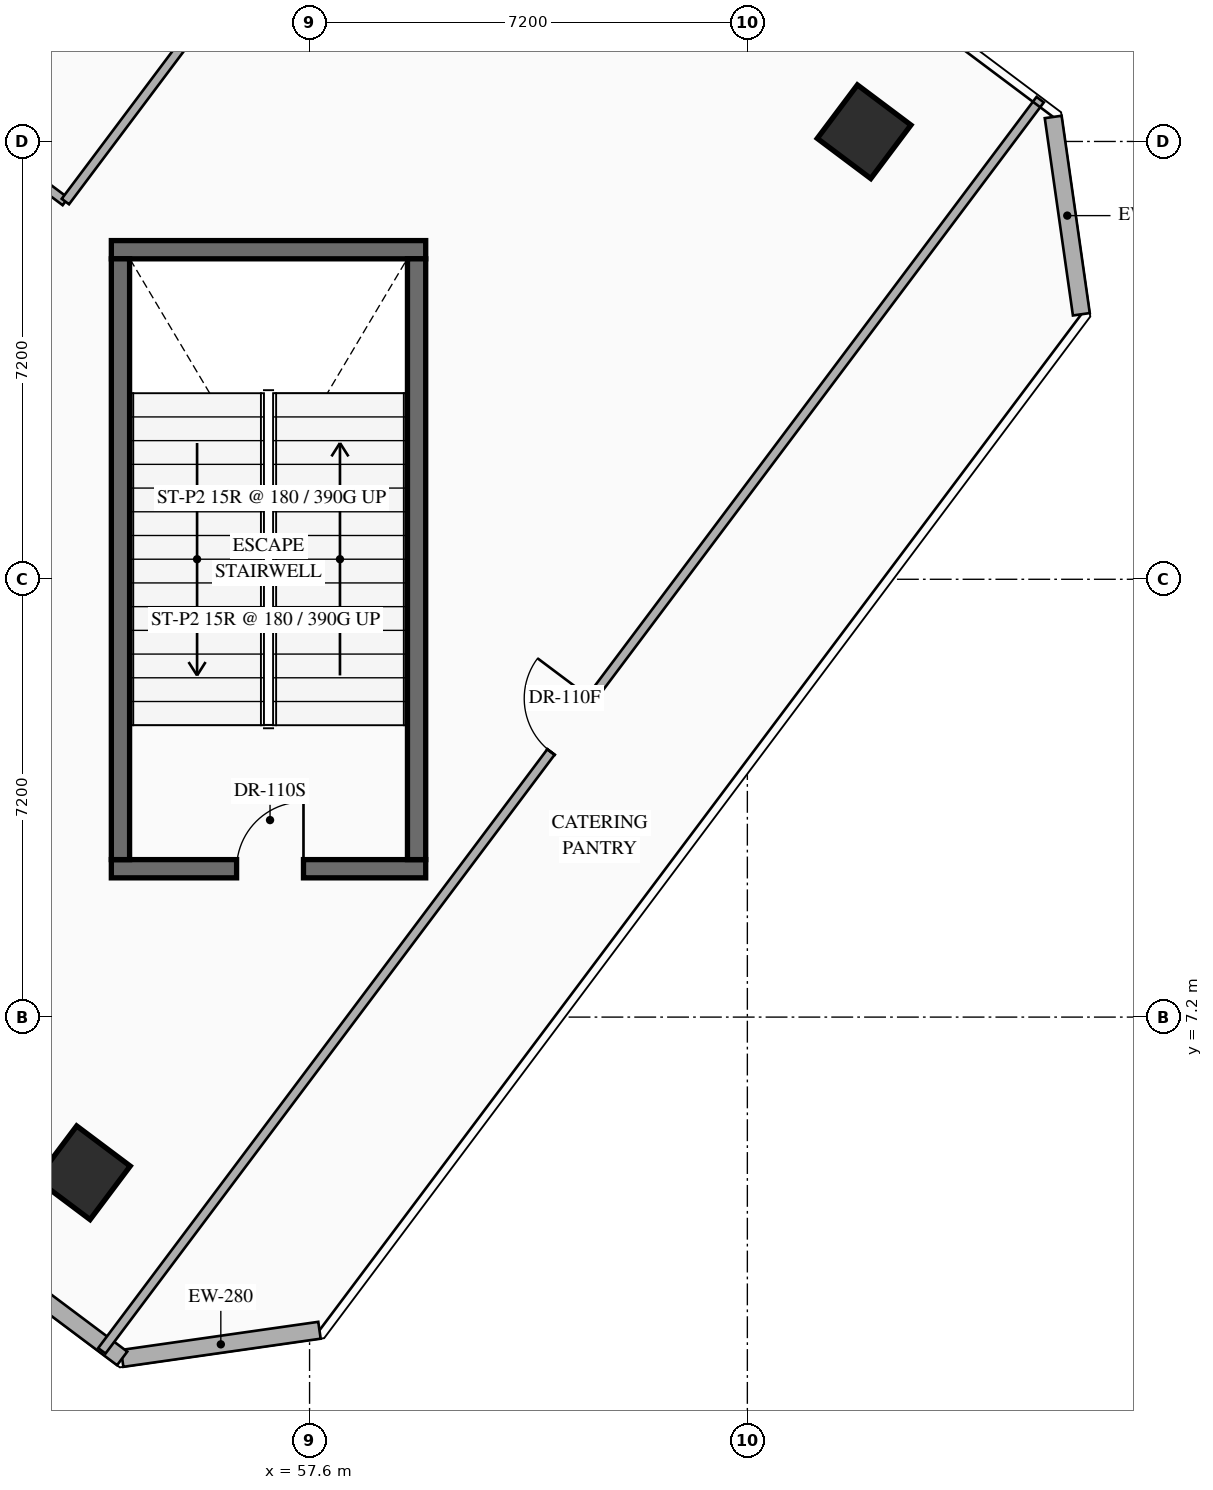
"""IFC4 building model, lengths in metres.
Left out: names, types, materials, properties, quantities, classifications, styles, units other than length and angle.
Written with IfcOpenShell. Run it as: python <this file> out.ifc"""

import sys

from ifc_helpers import new_model, si_unit, direction, frame, frame_2d, origin, origin_2d, place, context, subcontext, project, spatial, rectangle, hollow_rectangle, extrude, element, fill, save


model = new_model("IFC4")
c1 = context("Model", 3, precision=1e-05, world=origin(), true_north=direction((0.0, 1.0)))
c2 = subcontext(c1, "Body", "Model", "MODEL_VIEW")
j1 = project(units=[si_unit("LENGTHUNIT", "METRE"), si_unit("PLANEANGLEUNIT", "RADIAN")], contexts=[c1])
p1 = place(None, origin())
s1 = spatial("IfcSite", under=j1, at=p1, CompositionType="ELEMENT")
p2 = place(p1, origin())
s2 = spatial("IfcBuilding", under=s1, at=p2, CompositionType="ELEMENT")
p3 = place(p2, frame((0.0, 0.0, 5.4)))
s3 = spatial("IfcBuildingStorey", under=s2, at=p3, CompositionType="ELEMENT", Elevation=5.4)
p4 = place(p3, frame((54.34, 9.64, 0.0), z_axis=(0.0, 0.0, 1.0), x_axis=(1.0, 0.0, 0.0)))
e1 = element("IfcWall", 1, at=p4, inside=s3, PredefinedType="SHEAR", context=c2, shape_type="SweptSolid", body=[
    extrude(rectangle(XDim=5.17, YDim=0.3, at=frame_2d((2.585, 0.0))), origin(), (0.0, 0.0, 1.0), 5.4),
])
p5 = place(p4, frame((2.06, 0.0, 0.0)))
e2 = element("IfcOpeningElement", 2, at=p5, cuts=e1, PredefinedType="OPENING", context=c2, shape_type="SweptSolid", body=[
    extrude(rectangle(XDim=1.1, YDim=2.2, at=frame_2d((0.55, 1.1))), frame((0.0, 0.16, 0.0), z_axis=(0.0, -1.0, 0.0), x_axis=(1.0, 0.0, 0.0)), (0.0, 0.0, 1.0), 0.32),
])
p6 = place(p3, frame((54.34, 19.82, 0.0), z_axis=(0.0, 0.0, 1.0), x_axis=(1.0, 0.0, 0.0)))
e3 = element("IfcWall", 3, at=p6, inside=s3, PredefinedType="SHEAR", context=c2, shape_type="SweptSolid", body=[
    extrude(rectangle(XDim=5.17, YDim=0.3, at=frame_2d((2.585, 0.0))), origin(), (0.0, 0.0, 1.0), 5.4),
])
for number, where, z_axis, x_axis in (
    (4, (54.49, 9.79, 0.0), (0.0, 0.0, 1.0), (0.0, 1.0, 0.0)),
    (5, (59.36, 9.79, 0.0), (0.0, 0.0, 1.0), (0.0, 1.0, 0.0)),
):
    element("IfcWall", number, at=place(p3, frame(where, z_axis=z_axis, x_axis=x_axis)), inside=s3, PredefinedType="SHEAR", context=c2, shape_type="SweptSolid", body=[
        extrude(rectangle(XDim=9.88, YDim=0.3, at=frame_2d((4.94, 0.0))), origin(), (0.0, 0.0, 1.0), 5.4),
    ])
for number, where, z_axis, x_axis in (
    (6, (53.88, 4.64, 0.0), (0.0, 0.0, 1.0), (0.8, -0.6, 0.0)),
    (7, (66.72, 21.76, 0.0), (0.0, 0.0, 1.0), (0.8, -0.6, 0.0)),
):
    element("IfcColumn", number, at=place(p3, frame(where, z_axis=z_axis, x_axis=x_axis)), inside=s3, PredefinedType="COLUMN", context=c2, shape_type="SweptSolid", body=[
        extrude(hollow_rectangle(XDim=1.1, YDim=1.1, WallThickness=0.04, at=origin_2d()), origin(), (0.0, 0.0, 1.0), 5.4),
    ])
for number, where, z_axis, x_axis in (
    (8, (69.83, 22.003, 0.0), (0.0, 0.0, 1.0), (0.141, -0.99, 0.0)),
    (9, (57.763, 2.05, 0.0), (0.0, 0.0, 1.0), (-0.99, -0.141, 0.0)),
):
    element("IfcWall", number, at=place(p3, frame(where, z_axis=z_axis, x_axis=x_axis)), inside=s3, PredefinedType="STANDARD", context=c2, shape_type="SweptSolid", body=[
        extrude(rectangle(XDim=3.278, YDim=0.28, at=frame_2d((1.639, 0.0))), origin(), (0.0, 0.0, 1.0), 5.1),
    ])
p7 = place(p3, frame((54.518, 1.587, 0.0), z_axis=(0.0, 0.0, 1.0), x_axis=(-0.800001601415, 0.599997864774, 0.0)))
e10 = element("IfcWall", 10, at=p7, inside=s3, PredefinedType="STANDARD", context=c2, shape_type="SweptSolid", body=[
    extrude(rectangle(XDim=36.589, YDim=0.28, at=frame_2d((18.294, 0.0))), origin(), (0.0, 0.0, 1.0), 5.1),
])
p8 = place(p3, frame((48.64, 24.32, 0.0), z_axis=(0.0, 0.0, 1.0), x_axis=(0.80000474051, -0.599993679268, 0.0)))
e11 = element("IfcWall", 11, at=p8, inside=s3, PredefinedType="PARTITIONING", context=c2, shape_type="SweptSolid", body=[
    extrude(rectangle(XDim=6.18, YDim=0.15, at=frame_2d((3.09, 0.0))), origin(), (0.0, 0.0, 1.0), 5.1),
])
p9 = place(p8, frame((2.59, 0.0, 0.0)))
e12 = element("IfcOpeningElement", 12, at=p9, cuts=e11, PredefinedType="OPENING", context=c2, shape_type="SweptSolid", body=[
    extrude(rectangle(XDim=1.0, YDim=2.15, at=frame_2d((0.5, 1.075))), frame((0.0, 0.085, 0.0), z_axis=(0.0, -1.0, 0.0), x_axis=(1.0, 0.0, 0.0)), (0.0, 0.0, 1.0), 0.17),
])
p10 = place(p3, frame((53.584, 20.612, 0.0), z_axis=(0.0, 0.0, 1.0), x_axis=(0.600003564151, 0.799997326874, 0.0)))
e13 = element("IfcWall", 13, at=p10, inside=s3, PredefinedType="PARTITIONING", context=c2, shape_type="SweptSolid", body=[
    extrude(rectangle(XDim=10.96, YDim=0.15, at=frame_2d((5.48, 0.0))), origin(), (0.0, 0.0, 1.0), 5.1),
])
p11 = place(p3, frame((54.184, 1.712, 0.0), z_axis=(0.0, 0.0, 1.0), x_axis=(0.59999392496, 0.800004556244, 0.0)))
e14 = element("IfcWall", 14, at=p11, inside=s3, PredefinedType="PARTITIONING", context=c2, shape_type="SweptSolid", body=[
    extrude(rectangle(XDim=25.72, YDim=0.15, at=frame_2d((12.86, 0.0))), origin(), (0.0, 0.0, 1.0), 5.1),
])
p12 = place(p11, frame((12.31, 0.0, 0.0)))
e15 = element("IfcOpeningElement", 15, at=p12, cuts=e14, PredefinedType="OPENING", context=c2, shape_type="SweptSolid", body=[
    extrude(rectangle(XDim=1.1, YDim=2.24, at=frame_2d((0.55, 1.12))), frame((0.0, 0.085, 0.0), z_axis=(0.0, -1.0, 0.0), x_axis=(1.0, 0.0, 0.0)), (0.0, 0.0, 1.0), 0.17),
])
p13 = place(p5, origin())
e16 = element("IfcDoor", 16, at=p13, inside=s3, OperationType="SINGLE_SWING_RIGHT", PredefinedType="DOOR", context=c2, shape_type="SweptSolid", body=[
    extrude(rectangle(XDim=1.1, YDim=2.2, at=frame_2d((0.55, 1.1))), frame((0.0, 0.025, 0.0), z_axis=(0.0, -1.0, 0.0), x_axis=(1.0, 0.0, 0.0)), (0.0, 0.0, 1.0), 0.05),
])
fill(e2, e16)
p14 = place(p12, origin())
e17 = element("IfcDoor", 17, at=p14, inside=s3, OperationType="SINGLE_SWING_RIGHT", PredefinedType="DOOR", context=c2, shape_type="SweptSolid", body=[
    extrude(rectangle(XDim=1.1, YDim=2.24, at=frame_2d((0.55, 1.12))), frame((0.0, 0.025, 0.0), z_axis=(0.0, -1.0, 0.0), x_axis=(1.0, 0.0, 0.0)), (0.0, 0.0, 1.0), 0.05),
])
fill(e15, e17)
save(model, sys.argv[1])
